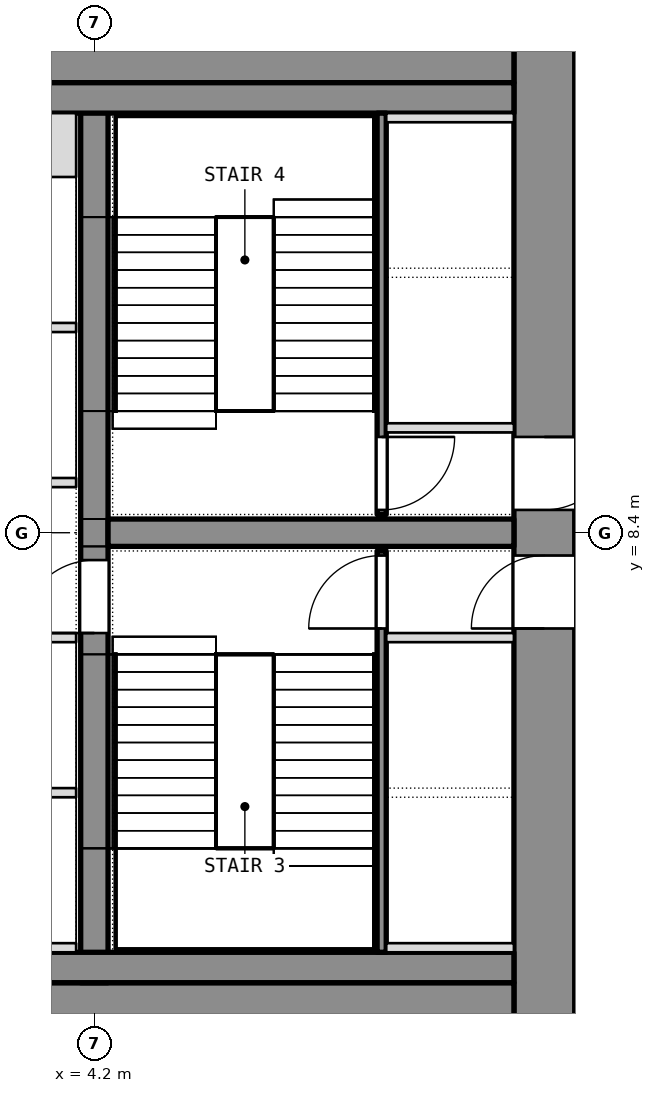
"""IFC4 building model, lengths in metres.
Left out: names, types, materials, properties, quantities, classifications, styles, units other than length and angle.
Written with IfcOpenShell. Run it as: python <this file> out.ifc"""

import sys

from ifc_helpers import new_model, si_unit, direction, frame, frame_2d, origin, place, context, subcontext, project, spatial, rectangle, extrude, element, fill, save


model = new_model("IFC4")
c1 = context("Model", 3, precision=1e-05, world=origin(), true_north=direction((0.0, 1.0)))
c2 = subcontext(c1, "Body", "Model", "MODEL_VIEW")
j1 = project(units=[si_unit("LENGTHUNIT", "METRE"), si_unit("PLANEANGLEUNIT", "RADIAN")], contexts=[c1])
p1 = place(None, origin())
s1 = spatial("IfcSite", under=j1, at=p1, CompositionType="ELEMENT")
p2 = place(p1, origin())
s2 = spatial("IfcBuilding", under=s1, at=p2, CompositionType="ELEMENT")
p3 = place(p2, frame((0.0, 0.0, 169.7)))
s3 = spatial("IfcBuildingStorey", under=s2, at=p3, CompositionType="ELEMENT", Elevation=169.7)
p4 = place(p3, frame((11.6, 0.0, 0.0), z_axis=(0.0, 0.0, 1.0), x_axis=(0.0, 1.0, 0.0)))
e1 = element("IfcWall", 1, at=p4, inside=s3, PredefinedType="SHEAR", context=c2, shape_type="SweptSolid", body=[
    extrude(rectangle(XDim=16.8, YDim=1.0, at=frame_2d((8.4, 0.0))), origin(), (0.0, 0.0, 1.0), 10.8),
])
p5 = place(p4, frame((6.825, 0.0, 0.0)))
e2 = element("IfcOpeningElement", 2, at=p5, cuts=e1, PredefinedType="OPENING", context=c2, shape_type="SweptSolid", body=[
    extrude(rectangle(XDim=1.2, YDim=2.1, at=frame_2d((0.6, 1.05))), frame((0.0, 0.5, 0.0), z_axis=(0.0, -1.0, 0.0), x_axis=(1.0, 0.0, 0.0)), (0.0, 0.0, 1.0), 1.0),
])
p6 = place(p4, frame((8.775, 0.0, 0.0)))
e3 = element("IfcOpeningElement", 3, at=p6, cuts=e1, PredefinedType="OPENING", context=c2, shape_type="SweptSolid", body=[
    extrude(rectangle(XDim=1.2, YDim=2.1, at=frame_2d((0.6, 1.05))), frame((0.0, 0.5, 0.0), z_axis=(0.0, -1.0, 0.0), x_axis=(1.0, 0.0, 0.0)), (0.0, 0.0, 1.0), 1.0),
])
p7 = place(p3, frame((-11.1, 0.5, 0.0), z_axis=(0.0, 0.0, 1.0), x_axis=(1.0, 0.0, 0.0)))
e4 = element("IfcWall", 4, at=p7, inside=s3, PredefinedType="SHEAR", context=c2, shape_type="SweptSolid", body=[
    extrude(rectangle(XDim=22.2, YDim=1.0, at=frame_2d((11.1, 0.0))), origin(), (0.0, 0.0, 1.0), 10.8),
])
p8 = place(p7, frame((10.85, 0.0, 0.0)))
e5 = element("IfcOpeningElement", 5, at=p8, cuts=e4, PredefinedType="OPENING", context=c2, shape_type="SweptSolid", body=[
    extrude(rectangle(XDim=1.4, YDim=2.1, at=frame_2d((0.7, 1.05))), frame((0.0, 0.5, 0.0), z_axis=(0.0, -1.0, 0.0), x_axis=(1.0, 0.0, 0.0)), (0.0, 0.0, 1.0), 1.0),
])
p9 = place(p3, frame((-11.1, 16.3, 0.0), z_axis=(0.0, 0.0, 1.0), x_axis=(1.0, 0.0, 0.0)))
e6 = element("IfcWall", 6, at=p9, inside=s3, PredefinedType="SHEAR", context=c2, shape_type="SweptSolid", body=[
    extrude(rectangle(XDim=22.2, YDim=1.0, at=frame_2d((11.1, 0.0))), origin(), (0.0, 0.0, 1.0), 10.8),
])
p10 = place(p9, frame((10.4, 0.0, 0.0)))
e7 = element("IfcOpeningElement", 7, at=p10, cuts=e6, PredefinedType="OPENING", context=c2, shape_type="SweptSolid", body=[
    extrude(rectangle(XDim=1.4, YDim=2.1, at=frame_2d((0.7, 1.05))), frame((0.0, 0.5, 0.0), z_axis=(0.0, -1.0, 0.0), x_axis=(1.0, 0.0, 0.0)), (0.0, 0.0, 1.0), 1.0),
])
p11 = place(p3, frame((4.2, 1.0, 0.0), z_axis=(0.0, 0.0, 1.0), x_axis=(0.0, 1.0, 0.0)))
e8 = element("IfcWall", 8, at=p11, inside=s3, PredefinedType="SHEAR", context=c2, shape_type="SweptSolid", body=[
    extrude(rectangle(XDim=14.8, YDim=0.45, at=frame_2d((7.4, 0.0))), origin(), (0.0, 0.0, 1.0), 10.8),
])
p12 = place(p11, frame((5.75, 0.0, 0.0)))
e9 = element("IfcOpeningElement", 9, at=p12, cuts=e8, PredefinedType="OPENING", context=c2, shape_type="SweptSolid", body=[
    extrude(rectangle(XDim=1.2, YDim=2.1, at=frame_2d((0.6, 1.05))), frame((0.0, 0.225, 0.0), z_axis=(0.0, -1.0, 0.0), x_axis=(1.0, 0.0, 0.0)), (0.0, 0.0, 1.0), 0.45),
])
p13 = place(p3, frame((4.425, 8.4, 0.0), z_axis=(0.0, 0.0, 1.0), x_axis=(1.0, 0.0, 0.0)))
e10 = element("IfcWall", 10, at=p13, inside=s3, PredefinedType="SHEAR", context=c2, shape_type="SweptSolid", body=[
    extrude(rectangle(XDim=6.675, YDim=0.45, at=frame_2d((3.337, 0.0))), origin(), (0.0, 0.0, 1.0), 10.8),
])
p14 = place(p3, frame((1.15, 1.25, 0.0), z_axis=(0.0, 0.0, 1.0), x_axis=(1.0, 0.0, 0.0)))
e11 = element("IfcWall", 11, at=p14, inside=s3, PredefinedType="PARTITIONING", context=c2, shape_type="SweptSolid", body=[
    extrude(rectangle(XDim=9.95, YDim=0.5, at=frame_2d((4.975, 0.0))), origin(), (0.0, 0.0, 1.0), 10.54),
])
p15 = place(p3, frame((0.9, 15.55, 0.0), z_axis=(0.0, 0.0, 1.0), x_axis=(1.0, 0.0, 0.0)))
e12 = element("IfcWall", 12, at=p15, inside=s3, PredefinedType="PARTITIONING", context=c2, shape_type="SweptSolid", body=[
    extrude(rectangle(XDim=10.2, YDim=0.5, at=frame_2d((5.1, 0.0))), origin(), (0.0, 0.0, 1.0), 10.54),
])
p16 = place(p3, frame((8.925, 1.5, 0.0), z_axis=(0.0, 0.0, 1.0), x_axis=(0.0, 1.0, 0.0)))
e13 = element("IfcWall", 13, at=p16, inside=s3, PredefinedType="SHEAR", context=c2, shape_type="SweptSolid", body=[
    extrude(rectangle(XDim=6.6, YDim=0.15, at=frame_2d((3.3, 0.0))), origin(), (0.0, 0.0, 1.0), 10.54),
])
p17 = place(p16, frame((5.325, 0.0, 0.0)))
e14 = element("IfcOpeningElement", 14, at=p17, cuts=e13, PredefinedType="OPENING", context=c2, shape_type="SweptSolid", body=[
    extrude(rectangle(XDim=1.2, YDim=2.1, at=frame_2d((0.6, 1.05))), frame((0.0, 0.075, 0.0), z_axis=(0.0, -1.0, 0.0), x_axis=(1.0, 0.0, 0.0)), (0.0, 0.0, 1.0), 0.15),
])
for number, where, z_axis, x_axis in (
    (15, (9.0, 6.675, 0.0), (0.0, 0.0, 1.0), (1.0, 0.0, 0.0)),
    (16, (9.0, 1.575, 0.0), (0.0, 0.0, 1.0), (1.0, 0.0, 0.0)),
):
    element("IfcWall", number, at=place(p3, frame(where, z_axis=z_axis, x_axis=x_axis)), inside=s3, PredefinedType="SHEAR", context=c2, shape_type="SweptSolid", body=[
        extrude(rectangle(XDim=2.1, YDim=0.15, at=frame_2d((1.05, 0.0))), origin(), (0.0, 0.0, 1.0), 10.8),
    ])
p18 = place(p3, frame((8.925, 8.7, 0.0), z_axis=(0.0, 0.0, 1.0), x_axis=(0.0, 1.0, 0.0)))
e17 = element("IfcWall", 17, at=p18, inside=s3, PredefinedType="SHEAR", context=c2, shape_type="SweptSolid", body=[
    extrude(rectangle(XDim=6.6, YDim=0.15, at=frame_2d((3.3, 0.0))), origin(), (0.0, 0.0, 1.0), 10.54),
])
p19 = place(p18, frame((0.075, 0.0, 0.0)))
e18 = element("IfcOpeningElement", 18, at=p19, cuts=e17, PredefinedType="OPENING", context=c2, shape_type="SweptSolid", body=[
    extrude(rectangle(XDim=1.2, YDim=2.1, at=frame_2d((0.6, 1.05))), frame((0.0, 0.075, 0.0), z_axis=(0.0, -1.0, 0.0), x_axis=(1.0, 0.0, 0.0)), (0.0, 0.0, 1.0), 0.15),
])
for number, where, z_axis, x_axis in (
    (19, (9.0, 10.125, 0.0), (0.0, 0.0, 1.0), (1.0, 0.0, 0.0)),
    (20, (9.0, 15.225, 0.0), (0.0, 0.0, 1.0), (1.0, 0.0, 0.0)),
):
    element("IfcWall", number, at=place(p3, frame(where, z_axis=z_axis, x_axis=x_axis)), inside=s3, PredefinedType="SHEAR", context=c2, shape_type="SweptSolid", body=[
        extrude(rectangle(XDim=2.1, YDim=0.15, at=frame_2d((1.05, 0.0))), origin(), (0.0, 0.0, 1.0), 10.8),
    ])
p20 = place(p3, frame((-3.9, 4.125, 0.0), z_axis=(0.0, 0.0, 1.0), x_axis=(1.0, 0.0, 0.0)))
e21 = element("IfcWall", 21, at=p20, inside=s3, PredefinedType="PARTITIONING", context=c2, shape_type="SweptSolid", body=[
    extrude(rectangle(XDim=7.8, YDim=0.15, at=frame_2d((3.9, 0.0))), origin(), (0.0, 0.0, 1.0), 10.54),
])
p21 = place(p20, frame((3.75, 0.0, 0.0)))
e22 = element("IfcOpeningElement", 22, at=p21, cuts=e21, PredefinedType="OPENING", context=c2, shape_type="SweptSolid", body=[
    extrude(rectangle(XDim=1.2, YDim=2.1, at=frame_2d((0.6, 1.05))), frame((0.0, 0.075, 0.0), z_axis=(0.0, -1.0, 0.0), x_axis=(1.0, 0.0, 0.0)), (0.0, 0.0, 1.0), 0.15),
])
p22 = place(p3, frame((-3.9, 11.775, 0.0), z_axis=(0.0, 0.0, 1.0), x_axis=(1.0, 0.0, 0.0)))
e23 = element("IfcWall", 23, at=p22, inside=s3, PredefinedType="PARTITIONING", context=c2, shape_type="SweptSolid", body=[
    extrude(rectangle(XDim=7.8, YDim=0.15, at=frame_2d((3.9, 0.0))), origin(), (0.0, 0.0, 1.0), 10.54),
])
p23 = place(p22, frame((3.3, 0.0, 0.0)))
e24 = element("IfcOpeningElement", 24, at=p23, cuts=e23, PredefinedType="OPENING", context=c2, shape_type="SweptSolid", body=[
    extrude(rectangle(XDim=1.2, YDim=2.1, at=frame_2d((0.6, 1.05))), frame((0.0, 0.075, 0.0), z_axis=(0.0, -1.0, 0.0), x_axis=(1.0, 0.0, 0.0)), (0.0, 0.0, 1.0), 0.15),
])
p24 = place(p3, frame((1.65, 1.575, 0.0), z_axis=(0.0, 0.0, 1.0), x_axis=(1.0, 0.0, 0.0)))
e25 = element("IfcWall", 25, at=p24, inside=s3, PredefinedType="SHEAR", context=c2, shape_type="SweptSolid", body=[
    extrude(rectangle(XDim=2.25, YDim=0.15, at=frame_2d((1.125, 0.0))), origin(), (0.0, 0.0, 1.0), 10.8),
])
p25 = place(p3, frame((1.65, 14.775, 0.0), z_axis=(0.0, 0.0, 1.0), x_axis=(1.0, 0.0, 0.0)))
e26 = element("IfcWall", 26, at=p25, inside=s3, PredefinedType="SHEAR", context=c2, shape_type="SweptSolid", body=[
    extrude(rectangle(XDim=2.25, YDim=1.05, at=frame_2d((1.125, 0.0))), origin(), (0.0, 0.0, 1.0), 10.8),
])
for number, where, z_axis, x_axis in (
    (27, (1.65, 6.675, 0.0), (0.0, 0.0, 1.0), (1.0, 0.0, 0.0)),
    (28, (1.65, 9.225, 0.0), (0.0, 0.0, 1.0), (1.0, 0.0, 0.0)),
):
    element("IfcWall", number, at=place(p3, frame(where, z_axis=z_axis, x_axis=x_axis)), inside=s3, PredefinedType="SHEAR", context=c2, shape_type="SweptSolid", body=[
        extrude(rectangle(XDim=2.25, YDim=0.15, at=frame_2d((1.125, 0.0))), origin(), (0.0, 0.0, 1.0), 10.8),
    ])
p26 = place(p5, origin())
e29 = element("IfcDoor", 29, at=p26, inside=s3, OperationType="SINGLE_SWING_LEFT", PredefinedType="DOOR", context=c2, shape_type="SweptSolid", body=[
    extrude(rectangle(XDim=1.2, YDim=2.1, at=frame_2d((0.6, 1.05))), frame((0.0, 0.025, 0.0), z_axis=(0.0, -1.0, 0.0), x_axis=(1.0, 0.0, 0.0)), (0.0, 0.0, 1.0), 0.05),
])
fill(e2, e29)
p27 = place(p17, origin())
e30 = element("IfcDoor", 30, at=p27, inside=s3, OperationType="SINGLE_SWING_LEFT", PredefinedType="DOOR", context=c2, shape_type="SweptSolid", body=[
    extrude(rectangle(XDim=1.2, YDim=2.1, at=frame_2d((0.6, 1.05))), frame((0.0, 0.025, 0.0), z_axis=(0.0, -1.0, 0.0), x_axis=(1.0, 0.0, 0.0)), (0.0, 0.0, 1.0), 0.05),
])
fill(e14, e30)
p28 = place(p6, origin())
e31 = element("IfcDoor", 31, at=p28, inside=s3, OperationType="SINGLE_SWING_LEFT", PredefinedType="DOOR", context=c2, shape_type="SweptSolid", body=[
    extrude(rectangle(XDim=1.2, YDim=2.1, at=frame_2d((0.6, 1.05))), frame((0.0, 0.025, 0.0), z_axis=(0.0, -1.0, 0.0), x_axis=(1.0, 0.0, 0.0)), (0.0, 0.0, 1.0), 0.05),
])
fill(e3, e31)
p29 = place(p19, origin())
e32 = element("IfcDoor", 32, at=p29, inside=s3, OperationType="SINGLE_SWING_LEFT", PredefinedType="DOOR", context=c2, shape_type="SweptSolid", body=[
    extrude(rectangle(XDim=1.2, YDim=2.1, at=frame_2d((0.6, 1.05))), frame((0.0, 0.025, 0.0), z_axis=(0.0, -1.0, 0.0), x_axis=(1.0, 0.0, 0.0)), (0.0, 0.0, 1.0), 0.05),
])
fill(e18, e32)
p30 = place(p12, origin())
e33 = element("IfcDoor", 33, at=p30, inside=s3, OperationType="SINGLE_SWING_LEFT", PredefinedType="DOOR", context=c2, shape_type="SweptSolid", body=[
    extrude(rectangle(XDim=1.2, YDim=2.1, at=frame_2d((0.6, 1.05))), frame((0.0, 0.025, 0.0), z_axis=(0.0, -1.0, 0.0), x_axis=(1.0, 0.0, 0.0)), (0.0, 0.0, 1.0), 0.05),
])
fill(e9, e33)
save(model, sys.argv[1])
